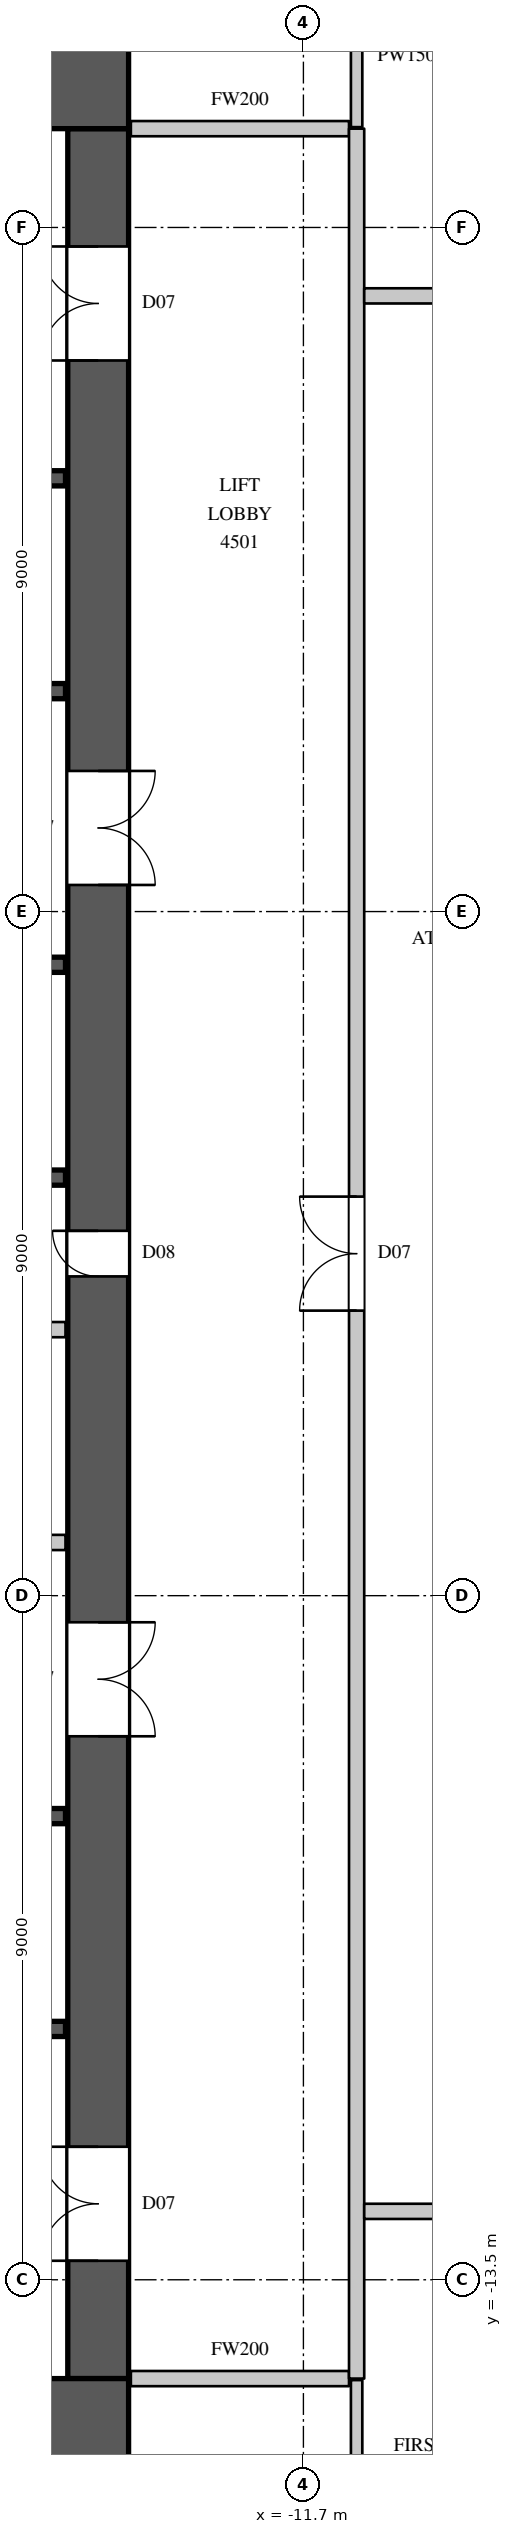
"""IFC4 building model, lengths in metres.
Left out: names, types, materials, properties, quantities, classifications, styles, units other than length and angle.
Written with IfcOpenShell. Run it as: python <this file> out.ifc"""

import sys

from ifc_helpers import new_model, si_unit, direction, frame, frame_2d, origin, place, context, subcontext, project, spatial, rectangle, extrude, element, fill, save


model = new_model("IFC4")
c1 = context("Model", 3, precision=1e-05, world=origin(), true_north=direction((0.0, 1.0)))
c2 = subcontext(c1, "Body", "Model", "MODEL_VIEW")
j1 = project(units=[si_unit("LENGTHUNIT", "METRE"), si_unit("PLANEANGLEUNIT", "RADIAN")], contexts=[c1])
p1 = place(None, origin())
s1 = spatial("IfcSite", under=j1, at=p1, CompositionType="ELEMENT")
p2 = place(p1, origin())
s2 = spatial("IfcBuilding", under=s1, at=p2, CompositionType="ELEMENT")
p3 = place(p2, frame((0.0, 0.0, 205.6)))
s3 = spatial("IfcBuildingStorey", under=s2, at=p3, CompositionType="ELEMENT", Elevation=205.6)
for number, where, z_axis, x_axis in (
    (1, (-30.0, 15.4, 0.0), (0.0, 0.0, 1.0), (1.0, 0.0, 0.0)),
    (2, (-30.0, -15.4, 0.0), (0.0, 0.0, 1.0), (1.0, 0.0, 0.0)),
):
    element("IfcWall", number, at=place(p3, frame(where, z_axis=z_axis, x_axis=x_axis)), inside=s3, PredefinedType="SHEAR", context=c2, shape_type="SweptSolid", body=[
        extrude(rectangle(XDim=16.0, YDim=1.2, at=frame_2d((8.0, 0.0))), origin(), (0.0, 0.0, 1.0), 4.1),
    ])
p4 = place(p3, frame((-14.4, -14.8, 0.0), z_axis=(0.0, 0.0, 1.0), x_axis=(0.0, 1.0, 0.0)))
e3 = element("IfcWall", 3, at=p4, inside=s3, PredefinedType="SHEAR", context=c2, shape_type="SweptSolid", body=[
    extrude(rectangle(XDim=29.6, YDim=0.8, at=frame_2d((14.8, 0.0))), origin(), (0.0, 0.0, 1.0), 4.1),
])
p5 = place(p4, frame((1.55, 0.0, 0.0)))
e4 = element("IfcOpeningElement", 4, at=p5, cuts=e3, PredefinedType="OPENING", context=c2, shape_type="SweptSolid", body=[
    extrude(rectangle(XDim=1.5, YDim=2.4, at=frame_2d((0.75, 1.2))), frame((0.0, 0.41, 0.0), z_axis=(0.0, -1.0, 0.0), x_axis=(1.0, 0.0, 0.0)), (0.0, 0.0, 1.0), 0.82),
])
p6 = place(p4, frame((26.55, 0.0, 0.0)))
e5 = element("IfcOpeningElement", 5, at=p6, cuts=e3, PredefinedType="OPENING", context=c2, shape_type="SweptSolid", body=[
    extrude(rectangle(XDim=1.5, YDim=2.4, at=frame_2d((0.75, 1.2))), frame((0.0, 0.41, 0.0), z_axis=(0.0, -1.0, 0.0), x_axis=(1.0, 0.0, 0.0)), (0.0, 0.0, 1.0), 0.82),
])
p7 = place(p4, frame((8.45, 0.0, 0.0)))
e6 = element("IfcOpeningElement", 6, at=p7, cuts=e3, PredefinedType="OPENING", context=c2, shape_type="SweptSolid", body=[
    extrude(rectangle(XDim=1.5, YDim=2.4, at=frame_2d((0.75, 1.2))), frame((0.0, 0.41, 0.0), z_axis=(0.0, -1.0, 0.0), x_axis=(1.0, 0.0, 0.0)), (0.0, 0.0, 1.0), 0.82),
])
p8 = place(p4, frame((19.65, 0.0, 0.0)))
e7 = element("IfcOpeningElement", 7, at=p8, cuts=e3, PredefinedType="OPENING", context=c2, shape_type="SweptSolid", body=[
    extrude(rectangle(XDim=1.5, YDim=2.4, at=frame_2d((0.75, 1.2))), frame((0.0, 0.41, 0.0), z_axis=(0.0, -1.0, 0.0), x_axis=(1.0, 0.0, 0.0)), (0.0, 0.0, 1.0), 0.82),
])
p9 = place(p4, frame((14.5, 0.0, 0.0)))
e8 = element("IfcOpeningElement", 8, at=p9, cuts=e3, PredefinedType="OPENING", context=c2, shape_type="SweptSolid", body=[
    extrude(rectangle(XDim=0.6, YDim=2.0, at=frame_2d((0.3, 1.0))), frame((0.0, 0.41, 0.0), z_axis=(0.0, -1.0, 0.0), x_axis=(1.0, 0.0, 0.0)), (0.0, 0.0, 1.0), 0.82),
])
p10 = place(p3, frame((-23.42, -3.8, 0.0), z_axis=(0.0, 0.0, 1.0), x_axis=(1.0, 0.0, 0.0)))
e9 = element("IfcWall", 9, at=p10, inside=s3, PredefinedType="PARTITIONING", context=c2, shape_type="SweptSolid", body=[
    extrude(rectangle(XDim=8.59, YDim=0.2, at=frame_2d((4.295, 0.0))), origin(), (0.0, 0.0, 1.0), 3.8),
])
p11 = place(p10, frame((2.0, 0.0, 0.0)))
e10 = element("IfcOpeningElement", 10, at=p11, cuts=e9, PredefinedType="OPENING", context=c2, shape_type="SweptSolid", body=[
    extrude(rectangle(XDim=0.9, YDim=2.2, at=frame_2d((0.45, 1.1))), frame((0.0, 0.11, 0.0), z_axis=(0.0, -1.0, 0.0), x_axis=(1.0, 0.0, 0.0)), (0.0, 0.0, 1.0), 0.22),
])
p12 = place(p10, frame((6.15, 0.0, 0.0)))
e11 = element("IfcOpeningElement", 11, at=p12, cuts=e9, PredefinedType="OPENING", context=c2, shape_type="SweptSolid", body=[
    extrude(rectangle(XDim=0.9, YDim=2.2, at=frame_2d((0.45, 1.1))), frame((0.0, 0.11, 0.0), z_axis=(0.0, -1.0, 0.0), x_axis=(1.0, 0.0, 0.0)), (0.0, 0.0, 1.0), 0.22),
])
for number, where, z_axis, x_axis in (
    (12, (-13.97, -14.8, 0.0), (0.0, 0.0, 1.0), (1.0, 0.0, 0.0)),
    (13, (-13.97, 14.8, 0.0), (0.0, 0.0, 1.0), (1.0, 0.0, 0.0)),
):
    element("IfcWall", number, at=place(p3, frame(where, z_axis=z_axis, x_axis=x_axis)), inside=s3, PredefinedType="PARTITIONING", context=c2, shape_type="SweptSolid", body=[
        extrude(rectangle(XDim=2.87, YDim=0.2, at=frame_2d((1.435, 0.0))), origin(), (0.0, 0.0, 1.0), 3.8),
    ])
p13 = place(p3, frame((-11.0, -14.8, 0.0), z_axis=(0.0, 0.0, 1.0), x_axis=(0.0, 1.0, 0.0)))
e14 = element("IfcWall", 14, at=p13, inside=s3, PredefinedType="PARTITIONING", context=c2, shape_type="SweptSolid", body=[
    extrude(rectangle(XDim=29.6, YDim=0.2, at=frame_2d((14.8, 0.0))), origin(), (0.0, 0.0, 1.0), 3.8),
])
p14 = place(p13, frame((14.05, 0.0, 0.0)))
e15 = element("IfcOpeningElement", 15, at=p14, cuts=e14, PredefinedType="OPENING", context=c2, shape_type="SweptSolid", body=[
    extrude(rectangle(XDim=1.5, YDim=2.4, at=frame_2d((0.75, 1.2))), frame((0.0, 0.11, 0.0), z_axis=(0.0, -1.0, 0.0), x_axis=(1.0, 0.0, 0.0)), (0.0, 0.0, 1.0), 0.22),
])
p15 = place(p3, frame((-10.9, -12.6, 0.0), z_axis=(0.0, 0.0, 1.0), x_axis=(1.0, 0.0, 0.0)))
e16 = element("IfcWall", 16, at=p15, inside=s3, PredefinedType="PARTITIONING", context=c2, shape_type="SweptSolid", body=[
    extrude(rectangle(XDim=15.521, YDim=0.2, at=frame_2d((7.76, 0.0))), origin(), (0.0, 0.0, 1.0), 3.8),
])
p16 = place(p15, frame((0.95, 0.0, 0.0)))
e17 = element("IfcOpeningElement", 17, at=p16, cuts=e16, PredefinedType="OPENING", context=c2, shape_type="SweptSolid", body=[
    extrude(rectangle(XDim=0.9, YDim=2.2, at=frame_2d((0.45, 1.1))), frame((0.0, 0.11, 0.0), z_axis=(0.0, -1.0, 0.0), x_axis=(1.0, 0.0, 0.0)), (0.0, 0.0, 1.0), 0.22),
])
p17 = place(p15, frame((3.95, 0.0, 0.0)))
e18 = element("IfcOpeningElement", 18, at=p17, cuts=e16, PredefinedType="OPENING", context=c2, shape_type="SweptSolid", body=[
    extrude(rectangle(XDim=0.9, YDim=2.2, at=frame_2d((0.45, 1.1))), frame((0.0, 0.11, 0.0), z_axis=(0.0, -1.0, 0.0), x_axis=(1.0, 0.0, 0.0)), (0.0, 0.0, 1.0), 0.22),
])
p18 = place(p15, frame((7.1, 0.0, 0.0)))
e19 = element("IfcOpeningElement", 19, at=p18, cuts=e16, PredefinedType="OPENING", context=c2, shape_type="SweptSolid", body=[
    extrude(rectangle(XDim=0.9, YDim=2.2, at=frame_2d((0.45, 1.1))), frame((0.0, 0.11, 0.0), z_axis=(0.0, -1.0, 0.0), x_axis=(1.0, 0.0, 0.0)), (0.0, 0.0, 1.0), 0.22),
])
p19 = place(p15, frame((10.0, 0.0, 0.0)))
e20 = element("IfcOpeningElement", 20, at=p19, cuts=e16, PredefinedType="OPENING", context=c2, shape_type="SweptSolid", body=[
    extrude(rectangle(XDim=0.9, YDim=2.2, at=frame_2d((0.45, 1.1))), frame((0.0, 0.11, 0.0), z_axis=(0.0, -1.0, 0.0), x_axis=(1.0, 0.0, 0.0)), (0.0, 0.0, 1.0), 0.22),
])
p20 = place(p15, frame((13.5, 0.0, 0.0)))
e21 = element("IfcOpeningElement", 21, at=p20, cuts=e16, PredefinedType="OPENING", context=c2, shape_type="SweptSolid", body=[
    extrude(rectangle(XDim=0.9, YDim=2.2, at=frame_2d((0.45, 1.1))), frame((0.0, 0.11, 0.0), z_axis=(0.0, -1.0, 0.0), x_axis=(1.0, 0.0, 0.0)), (0.0, 0.0, 1.0), 0.22),
])
p21 = place(p3, frame((-10.9, 12.6, 0.0), z_axis=(0.0, 0.0, 1.0), x_axis=(1.0, 0.0, 0.0)))
e22 = element("IfcWall", 22, at=p21, inside=s3, PredefinedType="PARTITIONING", context=c2, shape_type="SweptSolid", body=[
    extrude(rectangle(XDim=3.935, YDim=0.2, at=frame_2d((1.968, 0.0))), origin(), (0.0, 0.0, 1.0), 3.8),
])
p22 = place(p21, frame((1.7, 0.0, 0.0)))
e23 = element("IfcOpeningElement", 23, at=p22, cuts=e22, PredefinedType="OPENING", context=c2, shape_type="SweptSolid", body=[
    extrude(rectangle(XDim=1.1, YDim=2.4, at=frame_2d((0.55, 1.2))), frame((0.0, 0.11, 0.0), z_axis=(0.0, -1.0, 0.0), x_axis=(1.0, 0.0, 0.0)), (0.0, 0.0, 1.0), 0.22),
])
for number, where, z_axis, x_axis in (
    (24, (-11.0, -16.7, 0.0), (0.0, 0.0, 1.0), (0.0, 1.0, 0.0)),
    (25, (-11.0, 14.82, 0.0), (0.0, 0.0, 1.0), (0.0, 1.0, 0.0)),
):
    element("IfcWall", number, at=place(p3, frame(where, z_axis=z_axis, x_axis=x_axis)), inside=s3, PredefinedType="PARTITIONING", context=c2, shape_type="SweptSolid", body=[
        extrude(rectangle(XDim=1.88, YDim=0.15, at=frame_2d((0.94, 0.0))), origin(), (0.0, 0.0, 1.0), 3.8),
    ])
p23 = place(p3, frame((-29.17, -1.0, 0.0), z_axis=(0.0, 0.0, 1.0), x_axis=(1.0, 0.0, 0.0)))
e26 = element("IfcWall", 26, at=p23, inside=s3, PredefinedType="PARTITIONING", context=c2, shape_type="SweptSolid", body=[
    extrude(rectangle(XDim=14.34, YDim=0.2, at=frame_2d((7.17, 0.0))), origin(), (0.0, 0.0, 1.0), 3.8),
])
p24 = place(p3, frame((-26.08, 1.0, 0.0), z_axis=(0.0, 0.0, 1.0), x_axis=(1.0, 0.0, 0.0)))
e27 = element("IfcWall", 27, at=p24, inside=s3, PredefinedType="SHEAR", context=c2, shape_type="SweptSolid", body=[
    extrude(rectangle(XDim=11.25, YDim=0.2, at=frame_2d((5.625, 0.0))), origin(), (0.0, 0.0, 1.0), 3.8),
])
p25 = place(p3, frame((-26.08, 3.8, 0.0), z_axis=(0.0, 0.0, 1.0), x_axis=(1.0, 0.0, 0.0)))
e28 = element("IfcWall", 28, at=p25, inside=s3, PredefinedType="SHEAR", context=c2, shape_type="SweptSolid", body=[
    extrude(rectangle(XDim=11.25, YDim=0.2, at=frame_2d((5.625, 0.0))), origin(), (0.0, 0.0, 1.0), 3.8),
])
p26 = place(p25, frame((0.8, 0.0, 0.0)))
e29 = element("IfcOpeningElement", 29, at=p26, cuts=e28, PredefinedType="OPENING", context=c2, shape_type="SweptSolid", body=[
    extrude(rectangle(XDim=1.1, YDim=2.2, at=frame_2d((0.55, 1.1))), frame((0.0, 0.11, 0.0), z_axis=(0.0, -1.0, 0.0), x_axis=(1.0, 0.0, 0.0)), (0.0, 0.0, 1.0), 0.22),
])
p27 = place(p25, frame((3.55, 0.0, 0.0)))
e30 = element("IfcOpeningElement", 30, at=p27, cuts=e28, PredefinedType="OPENING", context=c2, shape_type="SweptSolid", body=[
    extrude(rectangle(XDim=1.1, YDim=2.2, at=frame_2d((0.55, 1.1))), frame((0.0, 0.11, 0.0), z_axis=(0.0, -1.0, 0.0), x_axis=(1.0, 0.0, 0.0)), (0.0, 0.0, 1.0), 0.22),
])
p28 = place(p25, frame((6.25, 0.0, 0.0)))
e31 = element("IfcOpeningElement", 31, at=p28, cuts=e28, PredefinedType="OPENING", context=c2, shape_type="SweptSolid", body=[
    extrude(rectangle(XDim=1.1, YDim=2.2, at=frame_2d((0.55, 1.1))), frame((0.0, 0.11, 0.0), z_axis=(0.0, -1.0, 0.0), x_axis=(1.0, 0.0, 0.0)), (0.0, 0.0, 1.0), 0.22),
])
p29 = place(p25, frame((9.15, 0.0, 0.0)))
e32 = element("IfcOpeningElement", 32, at=p29, cuts=e28, PredefinedType="OPENING", context=c2, shape_type="SweptSolid", body=[
    extrude(rectangle(XDim=1.1, YDim=2.2, at=frame_2d((0.55, 1.1))), frame((0.0, 0.11, 0.0), z_axis=(0.0, -1.0, 0.0), x_axis=(1.0, 0.0, 0.0)), (0.0, 0.0, 1.0), 0.22),
])
p30 = place(p3, frame((-17.92, -10.2, 0.0), z_axis=(0.0, 0.0, 1.0), x_axis=(1.0, 0.0, 0.0)))
e33 = element("IfcWall", 33, at=p30, inside=s3, PredefinedType="SHEAR", context=c2, shape_type="SweptSolid", body=[
    extrude(rectangle(XDim=3.09, YDim=0.2, at=frame_2d((1.545, 0.0))), origin(), (0.0, 0.0, 1.0), 3.8),
])
p31 = place(p30, frame((1.0, 0.0, 0.0)))
e34 = element("IfcOpeningElement", 34, at=p31, cuts=e33, PredefinedType="OPENING", context=c2, shape_type="SweptSolid", body=[
    extrude(rectangle(XDim=1.1, YDim=2.2, at=frame_2d((0.55, 1.1))), frame((0.0, 0.11, 0.0), z_axis=(0.0, -1.0, 0.0), x_axis=(1.0, 0.0, 0.0)), (0.0, 0.0, 1.0), 0.22),
])
p32 = place(p3, frame((-17.9, -7.4, 0.0), z_axis=(0.0, 0.0, 1.0), x_axis=(1.0, 0.0, 0.0)))
e35 = element("IfcWall", 35, at=p32, inside=s3, PredefinedType="SHEAR", context=c2, shape_type="SweptSolid", body=[
    extrude(rectangle(XDim=3.07, YDim=0.2, at=frame_2d((1.535, 0.0))), origin(), (0.0, 0.0, 1.0), 3.8),
])
p33 = place(p3, frame((-17.92, 7.4, 0.0), z_axis=(0.0, 0.0, 1.0), x_axis=(1.0, 0.0, 0.0)))
e36 = element("IfcWall", 36, at=p33, inside=s3, PredefinedType="SHEAR", context=c2, shape_type="SweptSolid", body=[
    extrude(rectangle(XDim=3.09, YDim=0.2, at=frame_2d((1.545, 0.0))), origin(), (0.0, 0.0, 1.0), 3.8),
])
p34 = place(p3, frame((-17.92, 10.2, 0.0), z_axis=(0.0, 0.0, 1.0), x_axis=(1.0, 0.0, 0.0)))
e37 = element("IfcWall", 37, at=p34, inside=s3, PredefinedType="SHEAR", context=c2, shape_type="SweptSolid", body=[
    extrude(rectangle(XDim=3.09, YDim=0.2, at=frame_2d((1.545, 0.0))), origin(), (0.0, 0.0, 1.0), 3.8),
])
p35 = place(p34, frame((1.0, 0.0, 0.0)))
e38 = element("IfcOpeningElement", 38, at=p35, cuts=e37, PredefinedType="OPENING", context=c2, shape_type="SweptSolid", body=[
    extrude(rectangle(XDim=1.1, YDim=2.2, at=frame_2d((0.55, 1.1))), frame((0.0, 0.11, 0.0), z_axis=(0.0, -1.0, 0.0), x_axis=(1.0, 0.0, 0.0)), (0.0, 0.0, 1.0), 0.22),
])
p36 = place(p14, origin())
e39 = element("IfcDoor", 39, at=p36, inside=s3, OperationType="DOUBLE_DOOR_SINGLE_SWING", PredefinedType="DOOR", context=c2, shape_type="SweptSolid", body=[
    extrude(rectangle(XDim=1.5, YDim=2.4, at=frame_2d((0.75, 1.2))), frame((0.0, 0.025, 0.0), z_axis=(0.0, -1.0, 0.0), x_axis=(1.0, 0.0, 0.0)), (0.0, 0.0, 1.0), 0.05),
])
fill(e15, e39)
p37 = place(p5, origin())
e40 = element("IfcDoor", 40, at=p37, inside=s3, OperationType="DOUBLE_DOOR_SINGLE_SWING", PredefinedType="DOOR", context=c2, shape_type="SweptSolid", body=[
    extrude(rectangle(XDim=1.5, YDim=2.4, at=frame_2d((0.75, 1.2))), frame((0.0, 0.395, 0.0), z_axis=(0.0, -1.0, 0.0), x_axis=(1.0, 0.0, 0.0)), (0.0, 0.0, 1.0), 0.05),
])
fill(e4, e40)
p38 = place(p6, origin())
e41 = element("IfcDoor", 41, at=p38, inside=s3, OperationType="DOUBLE_DOOR_SINGLE_SWING", PredefinedType="DOOR", context=c2, shape_type="SweptSolid", body=[
    extrude(rectangle(XDim=1.5, YDim=2.4, at=frame_2d((0.75, 1.2))), frame((0.0, 0.395, 0.0), z_axis=(0.0, -1.0, 0.0), x_axis=(1.0, 0.0, 0.0)), (0.0, 0.0, 1.0), 0.05),
])
fill(e5, e41)
p39 = place(p7, origin())
e42 = element("IfcDoor", 42, at=p39, inside=s3, OperationType="DOUBLE_DOOR_SINGLE_SWING", PredefinedType="DOOR", context=c2, shape_type="SweptSolid", body=[
    extrude(rectangle(XDim=1.5, YDim=2.4, at=frame_2d((0.75, 1.2))), frame((0.0, -0.345, 0.0), z_axis=(0.0, -1.0, 0.0), x_axis=(1.0, 0.0, 0.0)), (0.0, 0.0, 1.0), 0.05),
])
fill(e6, e42)
p40 = place(p8, origin())
e43 = element("IfcDoor", 43, at=p40, inside=s3, OperationType="DOUBLE_DOOR_SINGLE_SWING", PredefinedType="DOOR", context=c2, shape_type="SweptSolid", body=[
    extrude(rectangle(XDim=1.5, YDim=2.4, at=frame_2d((0.75, 1.2))), frame((0.0, -0.345, 0.0), z_axis=(0.0, -1.0, 0.0), x_axis=(1.0, 0.0, 0.0)), (0.0, 0.0, 1.0), 0.05),
])
fill(e7, e43)
p41 = place(p9, origin())
e44 = element("IfcDoor", 44, at=p41, inside=s3, OperationType="SINGLE_SWING_RIGHT", PredefinedType="DOOR", context=c2, shape_type="SweptSolid", body=[
    extrude(rectangle(XDim=0.6, YDim=2.0, at=frame_2d((0.3, 1.0))), frame((0.0, 0.395, 0.0), z_axis=(0.0, -1.0, 0.0), x_axis=(1.0, 0.0, 0.0)), (0.0, 0.0, 1.0), 0.05),
])
fill(e8, e44)
save(model, sys.argv[1])
